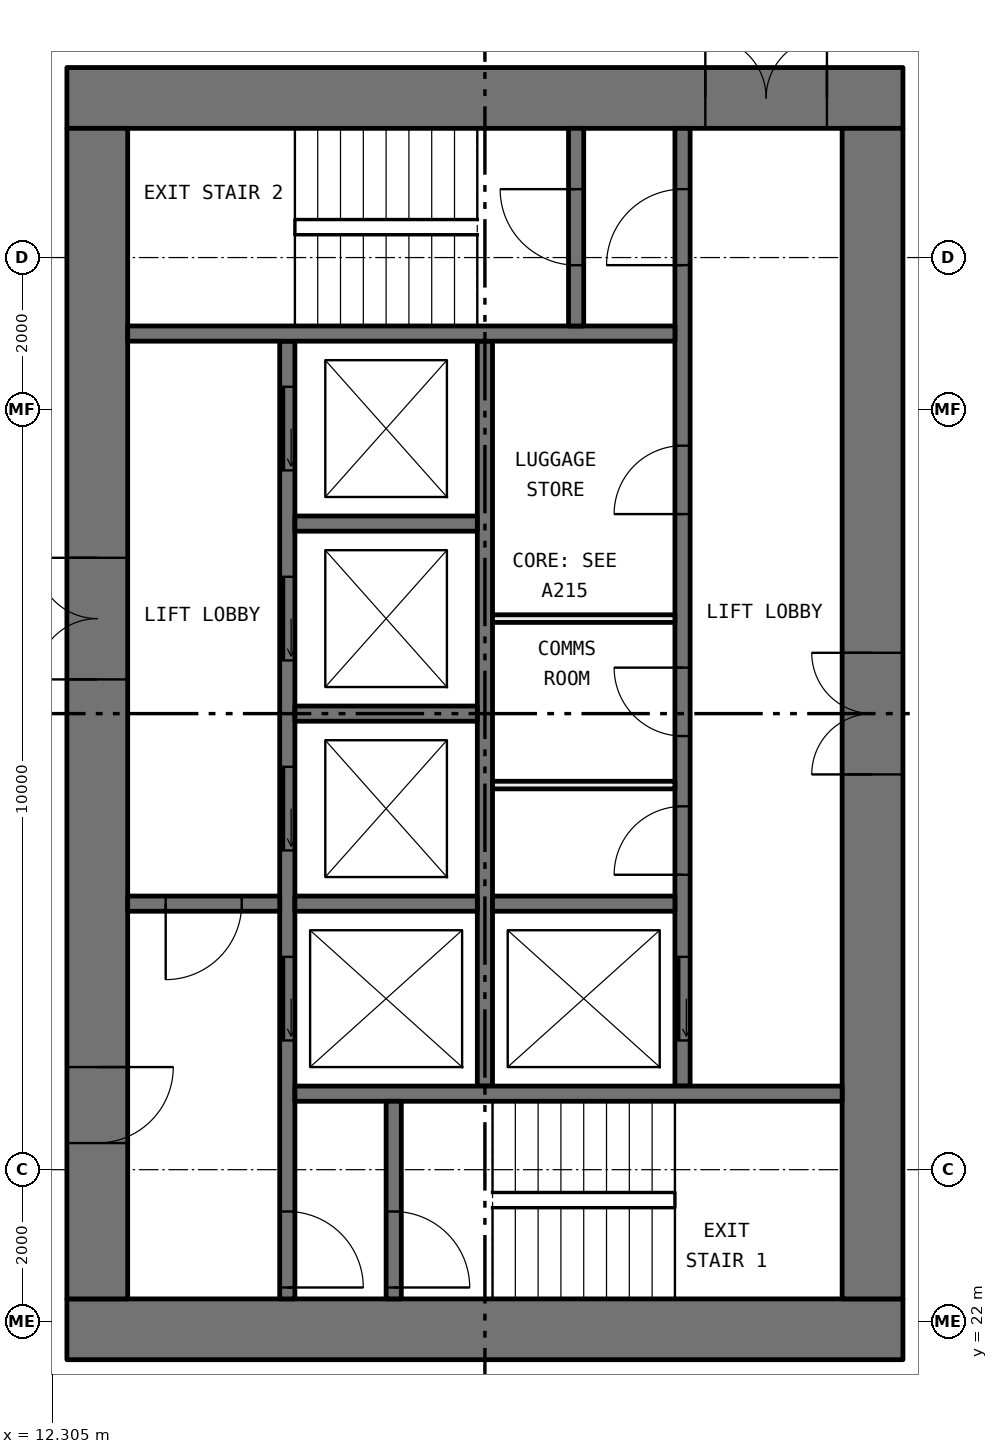
"""IFC4 building model, lengths in metres.
Left out: names, types, materials, properties, quantities, classifications, styles, units other than length and angle.
Written with IfcOpenShell. Run it as: python <this file> out.ifc"""

import sys

from ifc_helpers import new_model, si_unit, direction, frame, frame_2d, origin, place, context, subcontext, project, spatial, rectangle, extrude, element, fill, save


model = new_model("IFC4")
c1 = context("Model", 3, precision=1e-05, world=origin(), true_north=direction((0.0, 1.0)))
c2 = subcontext(c1, "Body", "Model", "MODEL_VIEW")
j1 = project(units=[si_unit("LENGTHUNIT", "METRE"), si_unit("PLANEANGLEUNIT", "RADIAN")], contexts=[c1])
p1 = place(None, origin())
s1 = spatial("IfcSite", under=j1, at=p1, CompositionType="ELEMENT")
p2 = place(p1, origin())
s2 = spatial("IfcBuilding", under=s1, at=p2, CompositionType="ELEMENT")
p3 = place(p2, frame((0.0, 0.0, 61.05)))
s3 = spatial("IfcBuildingStorey", under=s2, at=p3, CompositionType="ELEMENT", Elevation=61.05)
p4 = place(p3, frame((12.5, 21.9, 0.0), z_axis=(0.0, 0.0, 1.0), x_axis=(1.0, 0.0, 0.0)))
e1 = element("IfcWall", 1, at=p4, inside=s3, PredefinedType="SHEAR", context=c2, shape_type="SweptSolid", body=[
    extrude(rectangle(XDim=11.0, YDim=0.8, at=frame_2d((5.5, 0.0))), origin(), (0.0, 0.0, 1.0), 3.05),
])
p5 = place(p3, frame((12.5, 38.1, 0.0), z_axis=(0.0, 0.0, 1.0), x_axis=(1.0, 0.0, 0.0)))
e2 = element("IfcWall", 2, at=p5, inside=s3, PredefinedType="SHEAR", context=c2, shape_type="SweptSolid", body=[
    extrude(rectangle(XDim=11.0, YDim=0.8, at=frame_2d((5.5, 0.0))), origin(), (0.0, 0.0, 1.0), 3.05),
])
p6 = place(p5, frame((8.4, 0.0, 0.0)))
e3 = element("IfcOpeningElement", 3, at=p6, cuts=e2, PredefinedType="OPENING", context=c2, shape_type="SweptSolid", body=[
    extrude(rectangle(XDim=1.6, YDim=2.1, at=frame_2d((0.8, 1.05))), frame((0.0, 0.41, 0.0), z_axis=(0.0, -1.0, 0.0), x_axis=(1.0, 0.0, 0.0)), (0.0, 0.0, 1.0), 0.82),
])
p7 = place(p3, frame((12.9, 22.3, 0.0), z_axis=(0.0, 0.0, 1.0), x_axis=(0.0, 1.0, 0.0)))
e4 = element("IfcWall", 4, at=p7, inside=s3, PredefinedType="SHEAR", context=c2, shape_type="SweptSolid", body=[
    extrude(rectangle(XDim=15.4, YDim=0.8, at=frame_2d((7.7, 0.0))), origin(), (0.0, 0.0, 1.0), 3.05),
])
p8 = place(p7, frame((8.15, 0.0, 0.0)))
e5 = element("IfcOpeningElement", 5, at=p8, cuts=e4, PredefinedType="OPENING", context=c2, shape_type="SweptSolid", body=[
    extrude(rectangle(XDim=1.6, YDim=2.1, at=frame_2d((0.8, 1.05))), frame((0.0, 0.41, 0.0), z_axis=(0.0, -1.0, 0.0), x_axis=(1.0, 0.0, 0.0)), (0.0, 0.0, 1.0), 0.82),
])
p9 = place(p7, frame((2.05, 0.0, 0.0)))
e6 = element("IfcOpeningElement", 6, at=p9, cuts=e4, PredefinedType="OPENING", context=c2, shape_type="SweptSolid", body=[
    extrude(rectangle(XDim=1.0, YDim=2.1, at=frame_2d((0.5, 1.05))), frame((0.0, 0.41, 0.0), z_axis=(0.0, -1.0, 0.0), x_axis=(1.0, 0.0, 0.0)), (0.0, 0.0, 1.0), 0.82),
])
p10 = place(p3, frame((23.1, 22.3, 0.0), z_axis=(0.0, 0.0, 1.0), x_axis=(0.0, 1.0, 0.0)))
e7 = element("IfcWall", 7, at=p10, inside=s3, PredefinedType="SHEAR", context=c2, shape_type="SweptSolid", body=[
    extrude(rectangle(XDim=15.4, YDim=0.8, at=frame_2d((7.7, 0.0))), origin(), (0.0, 0.0, 1.0), 3.05),
])
p11 = place(p10, frame((6.9, 0.0, 0.0)))
e8 = element("IfcOpeningElement", 8, at=p11, cuts=e7, PredefinedType="OPENING", context=c2, shape_type="SweptSolid", body=[
    extrude(rectangle(XDim=1.6, YDim=2.1, at=frame_2d((0.8, 1.05))), frame((0.0, 0.41, 0.0), z_axis=(0.0, -1.0, 0.0), x_axis=(1.0, 0.0, 0.0)), (0.0, 0.0, 1.0), 0.82),
])
p12 = place(p3, frame((15.4, 22.3, 0.0), z_axis=(0.0, 0.0, 1.0), x_axis=(0.0, 1.0, 0.0)))
e9 = element("IfcWall", 9, at=p12, inside=s3, PredefinedType="SOLIDWALL", context=c2, shape_type="SweptSolid", body=[
    extrude(rectangle(XDim=12.6, YDim=0.2, at=frame_2d((6.3, 0.0))), origin(), (0.0, 0.0, 1.0), 3.05),
])
p13 = place(p12, frame((3.4, 0.0, 0.0)))
e10 = element("IfcOpeningElement", 10, at=p13, cuts=e9, PredefinedType="OPENING", context=c2, shape_type="SweptSolid", body=[
    extrude(rectangle(XDim=1.1, YDim=2.1, at=frame_2d((0.55, 1.05))), frame((0.0, 0.11, 0.0), z_axis=(0.0, -1.0, 0.0), x_axis=(1.0, 0.0, 0.0)), (0.0, 0.0, 1.0), 0.22),
])
p14 = place(p12, frame((5.9, 0.0, 0.0)))
e11 = element("IfcOpeningElement", 11, at=p14, cuts=e9, PredefinedType="OPENING", context=c2, shape_type="SweptSolid", body=[
    extrude(rectangle(XDim=1.1, YDim=2.1, at=frame_2d((0.55, 1.05))), frame((0.0, 0.11, 0.0), z_axis=(0.0, -1.0, 0.0), x_axis=(1.0, 0.0, 0.0)), (0.0, 0.0, 1.0), 0.22),
])
p15 = place(p12, frame((8.4, 0.0, 0.0)))
e12 = element("IfcOpeningElement", 12, at=p15, cuts=e9, PredefinedType="OPENING", context=c2, shape_type="SweptSolid", body=[
    extrude(rectangle(XDim=1.1, YDim=2.1, at=frame_2d((0.55, 1.05))), frame((0.0, 0.11, 0.0), z_axis=(0.0, -1.0, 0.0), x_axis=(1.0, 0.0, 0.0)), (0.0, 0.0, 1.0), 0.22),
])
p16 = place(p12, frame((10.9, 0.0, 0.0)))
e13 = element("IfcOpeningElement", 13, at=p16, cuts=e9, PredefinedType="OPENING", context=c2, shape_type="SweptSolid", body=[
    extrude(rectangle(XDim=1.1, YDim=2.1, at=frame_2d((0.55, 1.05))), frame((0.0, 0.11, 0.0), z_axis=(0.0, -1.0, 0.0), x_axis=(1.0, 0.0, 0.0)), (0.0, 0.0, 1.0), 0.22),
])
p17 = place(p12, frame((0.15, 0.0, 0.0)))
e14 = element("IfcOpeningElement", 14, at=p17, cuts=e9, PredefinedType="OPENING", context=c2, shape_type="SweptSolid", body=[
    extrude(rectangle(XDim=1.0, YDim=2.1, at=frame_2d((0.5, 1.05))), frame((0.0, 0.11, 0.0), z_axis=(0.0, -1.0, 0.0), x_axis=(1.0, 0.0, 0.0)), (0.0, 0.0, 1.0), 0.22),
])
p18 = place(p3, frame((20.6, 25.1, 0.0), z_axis=(0.0, 0.0, 1.0), x_axis=(0.0, 1.0, 0.0)))
e15 = element("IfcWall", 15, at=p18, inside=s3, PredefinedType="SOLIDWALL", context=c2, shape_type="SweptSolid", body=[
    extrude(rectangle(XDim=12.6, YDim=0.2, at=frame_2d((6.3, 0.0))), origin(), (0.0, 0.0, 1.0), 3.05),
])
p19 = place(p18, frame((0.6, 0.0, 0.0)))
e16 = element("IfcOpeningElement", 16, at=p19, cuts=e15, PredefinedType="OPENING", context=c2, shape_type="SweptSolid", body=[
    extrude(rectangle(XDim=1.1, YDim=2.1, at=frame_2d((0.55, 1.05))), frame((0.0, 0.11, 0.0), z_axis=(0.0, -1.0, 0.0), x_axis=(1.0, 0.0, 0.0)), (0.0, 0.0, 1.0), 0.22),
])
p20 = place(p18, frame((10.8, 0.0, 0.0)))
e17 = element("IfcOpeningElement", 17, at=p20, cuts=e15, PredefinedType="OPENING", context=c2, shape_type="SweptSolid", body=[
    extrude(rectangle(XDim=1.0, YDim=2.1, at=frame_2d((0.5, 1.05))), frame((0.0, 0.11, 0.0), z_axis=(0.0, -1.0, 0.0), x_axis=(1.0, 0.0, 0.0)), (0.0, 0.0, 1.0), 0.22),
])
p21 = place(p18, frame((2.78, 0.0, 0.0)))
e18 = element("IfcOpeningElement", 18, at=p21, cuts=e15, PredefinedType="OPENING", context=c2, shape_type="SweptSolid", body=[
    extrude(rectangle(XDim=0.9, YDim=2.1, at=frame_2d((0.45, 1.05))), frame((0.0, 0.11, 0.0), z_axis=(0.0, -1.0, 0.0), x_axis=(1.0, 0.0, 0.0)), (0.0, 0.0, 1.0), 0.22),
])
p22 = place(p18, frame((4.605, 0.0, 0.0)))
e19 = element("IfcOpeningElement", 19, at=p22, cuts=e15, PredefinedType="OPENING", context=c2, shape_type="SweptSolid", body=[
    extrude(rectangle(XDim=0.9, YDim=2.1, at=frame_2d((0.45, 1.05))), frame((0.0, 0.11, 0.0), z_axis=(0.0, -1.0, 0.0), x_axis=(1.0, 0.0, 0.0)), (0.0, 0.0, 1.0), 0.22),
])
p23 = place(p18, frame((7.525, 0.0, 0.0)))
e20 = element("IfcOpeningElement", 20, at=p23, cuts=e15, PredefinedType="OPENING", context=c2, shape_type="SweptSolid", body=[
    extrude(rectangle(XDim=0.9, YDim=2.1, at=frame_2d((0.45, 1.05))), frame((0.0, 0.11, 0.0), z_axis=(0.0, -1.0, 0.0), x_axis=(1.0, 0.0, 0.0)), (0.0, 0.0, 1.0), 0.22),
])
p24 = place(p3, frame((18.0, 25.1, 0.0), z_axis=(0.0, 0.0, 1.0), x_axis=(0.0, 1.0, 0.0)))
e21 = element("IfcWall", 21, at=p24, inside=s3, PredefinedType="SOLIDWALL", context=c2, shape_type="SweptSolid", body=[
    extrude(rectangle(XDim=9.8, YDim=0.2, at=frame_2d((4.9, 0.0))), origin(), (0.0, 0.0, 1.0), 3.05),
])
for number, where, z_axis, x_axis in (
    (22, (15.5, 25.0, 0.0), (0.0, 0.0, 1.0), (1.0, 0.0, 0.0)),
    (23, (13.3, 35.0, 0.0), (0.0, 0.0, 1.0), (1.0, 0.0, 0.0)),
):
    element("IfcWall", number, at=place(p3, frame(where, z_axis=z_axis, x_axis=x_axis)), inside=s3, PredefinedType="SOLIDWALL", context=c2, shape_type="SweptSolid", body=[
        extrude(rectangle(XDim=7.2, YDim=0.2, at=frame_2d((3.6, 0.0))), origin(), (0.0, 0.0, 1.0), 3.05),
    ])
p25 = place(p3, frame((13.3, 27.5, 0.0), z_axis=(0.0, 0.0, 1.0), x_axis=(1.0, 0.0, 0.0)))
e24 = element("IfcWall", 24, at=p25, inside=s3, PredefinedType="SOLIDWALL", context=c2, shape_type="SweptSolid", body=[
    extrude(rectangle(XDim=2.0, YDim=0.2, at=frame_2d((1.0, 0.0))), origin(), (0.0, 0.0, 1.0), 3.05),
])
p26 = place(p25, frame((0.5, 0.0, 0.0)))
e25 = element("IfcOpeningElement", 25, at=p26, cuts=e24, PredefinedType="OPENING", context=c2, shape_type="SweptSolid", body=[
    extrude(rectangle(XDim=1.0, YDim=2.1, at=frame_2d((0.5, 1.05))), frame((0.0, 0.11, 0.0), z_axis=(0.0, -1.0, 0.0), x_axis=(1.0, 0.0, 0.0)), (0.0, 0.0, 1.0), 0.22),
])
p27 = place(p3, frame((16.8, 22.3, 0.0), z_axis=(0.0, 0.0, 1.0), x_axis=(0.0, 1.0, 0.0)))
e26 = element("IfcWall", 26, at=p27, inside=s3, PredefinedType="SOLIDWALL", context=c2, shape_type="SweptSolid", body=[
    extrude(rectangle(XDim=2.6, YDim=0.2, at=frame_2d((1.3, 0.0))), origin(), (0.0, 0.0, 1.0), 3.05),
])
p28 = place(p27, frame((0.15, 0.0, 0.0)))
e27 = element("IfcOpeningElement", 27, at=p28, cuts=e26, PredefinedType="OPENING", context=c2, shape_type="SweptSolid", body=[
    extrude(rectangle(XDim=1.0, YDim=2.1, at=frame_2d((0.5, 1.05))), frame((0.0, 0.11, 0.0), z_axis=(0.0, -1.0, 0.0), x_axis=(1.0, 0.0, 0.0)), (0.0, 0.0, 1.0), 0.22),
])
p29 = place(p3, frame((19.2, 35.1, 0.0), z_axis=(0.0, 0.0, 1.0), x_axis=(0.0, 1.0, 0.0)))
e28 = element("IfcWall", 28, at=p29, inside=s3, PredefinedType="SOLIDWALL", context=c2, shape_type="SweptSolid", body=[
    extrude(rectangle(XDim=2.6, YDim=0.2, at=frame_2d((1.3, 0.0))), origin(), (0.0, 0.0, 1.0), 3.05),
])
p30 = place(p29, frame((0.8, 0.0, 0.0)))
e29 = element("IfcOpeningElement", 29, at=p30, cuts=e28, PredefinedType="OPENING", context=c2, shape_type="SweptSolid", body=[
    extrude(rectangle(XDim=1.0, YDim=2.1, at=frame_2d((0.5, 1.05))), frame((0.0, 0.11, 0.0), z_axis=(0.0, -1.0, 0.0), x_axis=(1.0, 0.0, 0.0)), (0.0, 0.0, 1.0), 0.22),
])
for number, where, z_axis, x_axis in (
    (30, (15.5, 27.5, 0.0), (0.0, 0.0, 1.0), (1.0, 0.0, 0.0)),
    (31, (15.5, 30.0, 0.0), (0.0, 0.0, 1.0), (1.0, 0.0, 0.0)),
    (32, (15.5, 32.5, 0.0), (0.0, 0.0, 1.0), (1.0, 0.0, 0.0)),
    (33, (18.1, 27.5, 0.0), (0.0, 0.0, 1.0), (1.0, 0.0, 0.0)),
):
    element("IfcWall", number, at=place(p3, frame(where, z_axis=z_axis, x_axis=x_axis)), inside=s3, PredefinedType="SOLIDWALL", context=c2, shape_type="SweptSolid", body=[
        extrude(rectangle(XDim=2.4, YDim=0.2, at=frame_2d((1.2, 0.0))), origin(), (0.0, 0.0, 1.0), 3.05),
    ])
for number, where, z_axis, x_axis in (
    (34, (18.1, 29.06, 0.0), (0.0, 0.0, 1.0), (1.0, 0.0, 0.0)),
    (35, (18.1, 31.25, 0.0), (0.0, 0.0, 1.0), (1.0, 0.0, 0.0)),
):
    element("IfcWall", number, at=place(p3, frame(where, z_axis=z_axis, x_axis=x_axis)), inside=s3, PredefinedType="PARTITIONING", context=c2, shape_type="SweptSolid", body=[
        extrude(rectangle(XDim=2.4, YDim=0.1, at=frame_2d((1.2, 0.0))), origin(), (0.0, 0.0, 1.0), 3.05),
    ])
p31 = place(p19, origin())
e36 = element("IfcDoor", 36, at=p31, inside=s3, OperationType="SLIDING_TO_LEFT", PredefinedType="DOOR", context=c2, shape_type="SweptSolid", body=[
    extrude(rectangle(XDim=1.1, YDim=2.1, at=frame_2d((0.55, 1.05))), frame((0.0, 0.025, 0.0), z_axis=(0.0, -1.0, 0.0), x_axis=(1.0, 0.0, 0.0)), (0.0, 0.0, 1.0), 0.05),
])
fill(e16, e36)
p32 = place(p13, origin())
e37 = element("IfcDoor", 37, at=p32, inside=s3, OperationType="SLIDING_TO_LEFT", PredefinedType="DOOR", context=c2, shape_type="SweptSolid", body=[
    extrude(rectangle(XDim=1.1, YDim=2.1, at=frame_2d((0.55, 1.05))), frame((0.0, 0.025, 0.0), z_axis=(0.0, -1.0, 0.0), x_axis=(1.0, 0.0, 0.0)), (0.0, 0.0, 1.0), 0.05),
])
fill(e10, e37)
p33 = place(p14, origin())
e38 = element("IfcDoor", 38, at=p33, inside=s3, OperationType="SLIDING_TO_LEFT", PredefinedType="DOOR", context=c2, shape_type="SweptSolid", body=[
    extrude(rectangle(XDim=1.1, YDim=2.1, at=frame_2d((0.55, 1.05))), frame((0.0, 0.025, 0.0), z_axis=(0.0, -1.0, 0.0), x_axis=(1.0, 0.0, 0.0)), (0.0, 0.0, 1.0), 0.05),
])
fill(e11, e38)
p34 = place(p15, origin())
e39 = element("IfcDoor", 39, at=p34, inside=s3, OperationType="SLIDING_TO_LEFT", PredefinedType="DOOR", context=c2, shape_type="SweptSolid", body=[
    extrude(rectangle(XDim=1.1, YDim=2.1, at=frame_2d((0.55, 1.05))), frame((0.0, 0.025, 0.0), z_axis=(0.0, -1.0, 0.0), x_axis=(1.0, 0.0, 0.0)), (0.0, 0.0, 1.0), 0.05),
])
fill(e12, e39)
p35 = place(p16, origin())
e40 = element("IfcDoor", 40, at=p35, inside=s3, OperationType="SLIDING_TO_LEFT", PredefinedType="DOOR", context=c2, shape_type="SweptSolid", body=[
    extrude(rectangle(XDim=1.1, YDim=2.1, at=frame_2d((0.55, 1.05))), frame((0.0, 0.025, 0.0), z_axis=(0.0, -1.0, 0.0), x_axis=(1.0, 0.0, 0.0)), (0.0, 0.0, 1.0), 0.05),
])
fill(e13, e40)
p36 = place(p28, frame((1.0, 0.0, 0.0), x_axis=(-1.0, 0.0, 0.0)))
e41 = element("IfcDoor", 41, at=p36, inside=s3, OperationType="SINGLE_SWING_LEFT", PredefinedType="DOOR", context=c2, shape_type="SweptSolid", body=[
    extrude(rectangle(XDim=1.0, YDim=2.1, at=frame_2d((0.5, 1.05))), frame((0.0, 0.025, 0.0), z_axis=(0.0, -1.0, 0.0), x_axis=(1.0, 0.0, 0.0)), (0.0, 0.0, 1.0), 0.05),
])
fill(e27, e41)
p37 = place(p17, frame((1.0, 0.0, 0.0), x_axis=(-1.0, 0.0, 0.0)))
e42 = element("IfcDoor", 42, at=p37, inside=s3, OperationType="SINGLE_SWING_LEFT", PredefinedType="DOOR", context=c2, shape_type="SweptSolid", body=[
    extrude(rectangle(XDim=1.0, YDim=2.1, at=frame_2d((0.5, 1.05))), frame((0.0, 0.025, 0.0), z_axis=(0.0, -1.0, 0.0), x_axis=(1.0, 0.0, 0.0)), (0.0, 0.0, 1.0), 0.05),
])
fill(e14, e42)
p38 = place(p20, origin())
e43 = element("IfcDoor", 43, at=p38, inside=s3, OperationType="SINGLE_SWING_RIGHT", PredefinedType="DOOR", context=c2, shape_type="SweptSolid", body=[
    extrude(rectangle(XDim=1.0, YDim=2.1, at=frame_2d((0.5, 1.05))), frame((0.0, 0.025, 0.0), z_axis=(0.0, -1.0, 0.0), x_axis=(1.0, 0.0, 0.0)), (0.0, 0.0, 1.0), 0.05),
])
fill(e17, e43)
p39 = place(p30, origin())
e44 = element("IfcDoor", 44, at=p39, inside=s3, OperationType="SINGLE_SWING_LEFT", PredefinedType="DOOR", context=c2, shape_type="SweptSolid", body=[
    extrude(rectangle(XDim=1.0, YDim=2.1, at=frame_2d((0.5, 1.05))), frame((0.0, 0.025, 0.0), z_axis=(0.0, -1.0, 0.0), x_axis=(1.0, 0.0, 0.0)), (0.0, 0.0, 1.0), 0.05),
])
fill(e29, e44)
p40 = place(p26, frame((1.0, 0.0, 0.0), x_axis=(-1.0, 0.0, 0.0)))
e45 = element("IfcDoor", 45, at=p40, inside=s3, OperationType="SINGLE_SWING_LEFT", PredefinedType="DOOR", context=c2, shape_type="SweptSolid", body=[
    extrude(rectangle(XDim=1.0, YDim=2.1, at=frame_2d((0.5, 1.05))), frame((0.0, 0.025, 0.0), z_axis=(0.0, -1.0, 0.0), x_axis=(1.0, 0.0, 0.0)), (0.0, 0.0, 1.0), 0.05),
])
fill(e25, e45)
p41 = place(p8, origin())
e46 = element("IfcDoor", 46, at=p41, inside=s3, OperationType="DOUBLE_DOOR_SINGLE_SWING", PredefinedType="DOOR", context=c2, shape_type="SweptSolid", body=[
    extrude(rectangle(XDim=1.6, YDim=2.1, at=frame_2d((0.8, 1.05))), frame((0.0, 0.025, 0.0), z_axis=(0.0, -1.0, 0.0), x_axis=(1.0, 0.0, 0.0)), (0.0, 0.0, 1.0), 0.05),
])
fill(e5, e46)
p42 = place(p9, frame((1.0, 0.0, 0.0), x_axis=(-1.0, 0.0, 0.0)))
e47 = element("IfcDoor", 47, at=p42, inside=s3, OperationType="SINGLE_SWING_RIGHT", PredefinedType="DOOR", context=c2, shape_type="SweptSolid", body=[
    extrude(rectangle(XDim=1.0, YDim=2.1, at=frame_2d((0.5, 1.05))), frame((0.0, 0.025, 0.0), z_axis=(0.0, -1.0, 0.0), x_axis=(1.0, 0.0, 0.0)), (0.0, 0.0, 1.0), 0.05),
])
fill(e6, e47)
p43 = place(p6, origin())
e48 = element("IfcDoor", 48, at=p43, inside=s3, OperationType="DOUBLE_DOOR_SINGLE_SWING", PredefinedType="DOOR", context=c2, shape_type="SweptSolid", body=[
    extrude(rectangle(XDim=1.6, YDim=2.1, at=frame_2d((0.8, 1.05))), frame((0.0, 0.025, 0.0), z_axis=(0.0, -1.0, 0.0), x_axis=(1.0, 0.0, 0.0)), (0.0, 0.0, 1.0), 0.05),
])
fill(e3, e48)
p44 = place(p11, origin())
e49 = element("IfcDoor", 49, at=p44, inside=s3, OperationType="DOUBLE_DOOR_SINGLE_SWING", PredefinedType="DOOR", context=c2, shape_type="SweptSolid", body=[
    extrude(rectangle(XDim=1.6, YDim=2.1, at=frame_2d((0.8, 1.05))), frame((0.0, 0.025, 0.0), z_axis=(0.0, -1.0, 0.0), x_axis=(1.0, 0.0, 0.0)), (0.0, 0.0, 1.0), 0.05),
])
fill(e8, e49)
p45 = place(p21, origin())
e50 = element("IfcDoor", 50, at=p45, inside=s3, OperationType="SINGLE_SWING_RIGHT", PredefinedType="DOOR", context=c2, shape_type="SweptSolid", body=[
    extrude(rectangle(XDim=0.9, YDim=2.1, at=frame_2d((0.45, 1.05))), frame((0.0, 0.025, 0.0), z_axis=(0.0, -1.0, 0.0), x_axis=(1.0, 0.0, 0.0)), (0.0, 0.0, 1.0), 0.05),
])
fill(e18, e50)
p46 = place(p22, origin())
e51 = element("IfcDoor", 51, at=p46, inside=s3, OperationType="SINGLE_SWING_LEFT", PredefinedType="DOOR", context=c2, shape_type="SweptSolid", body=[
    extrude(rectangle(XDim=0.9, YDim=2.1, at=frame_2d((0.45, 1.05))), frame((0.0, 0.025, 0.0), z_axis=(0.0, -1.0, 0.0), x_axis=(1.0, 0.0, 0.0)), (0.0, 0.0, 1.0), 0.05),
])
fill(e19, e51)
p47 = place(p23, origin())
e52 = element("IfcDoor", 52, at=p47, inside=s3, OperationType="SINGLE_SWING_RIGHT", PredefinedType="DOOR", context=c2, shape_type="SweptSolid", body=[
    extrude(rectangle(XDim=0.9, YDim=2.1, at=frame_2d((0.45, 1.05))), frame((0.0, 0.025, 0.0), z_axis=(0.0, -1.0, 0.0), x_axis=(1.0, 0.0, 0.0)), (0.0, 0.0, 1.0), 0.05),
])
fill(e20, e52)
save(model, sys.argv[1])
